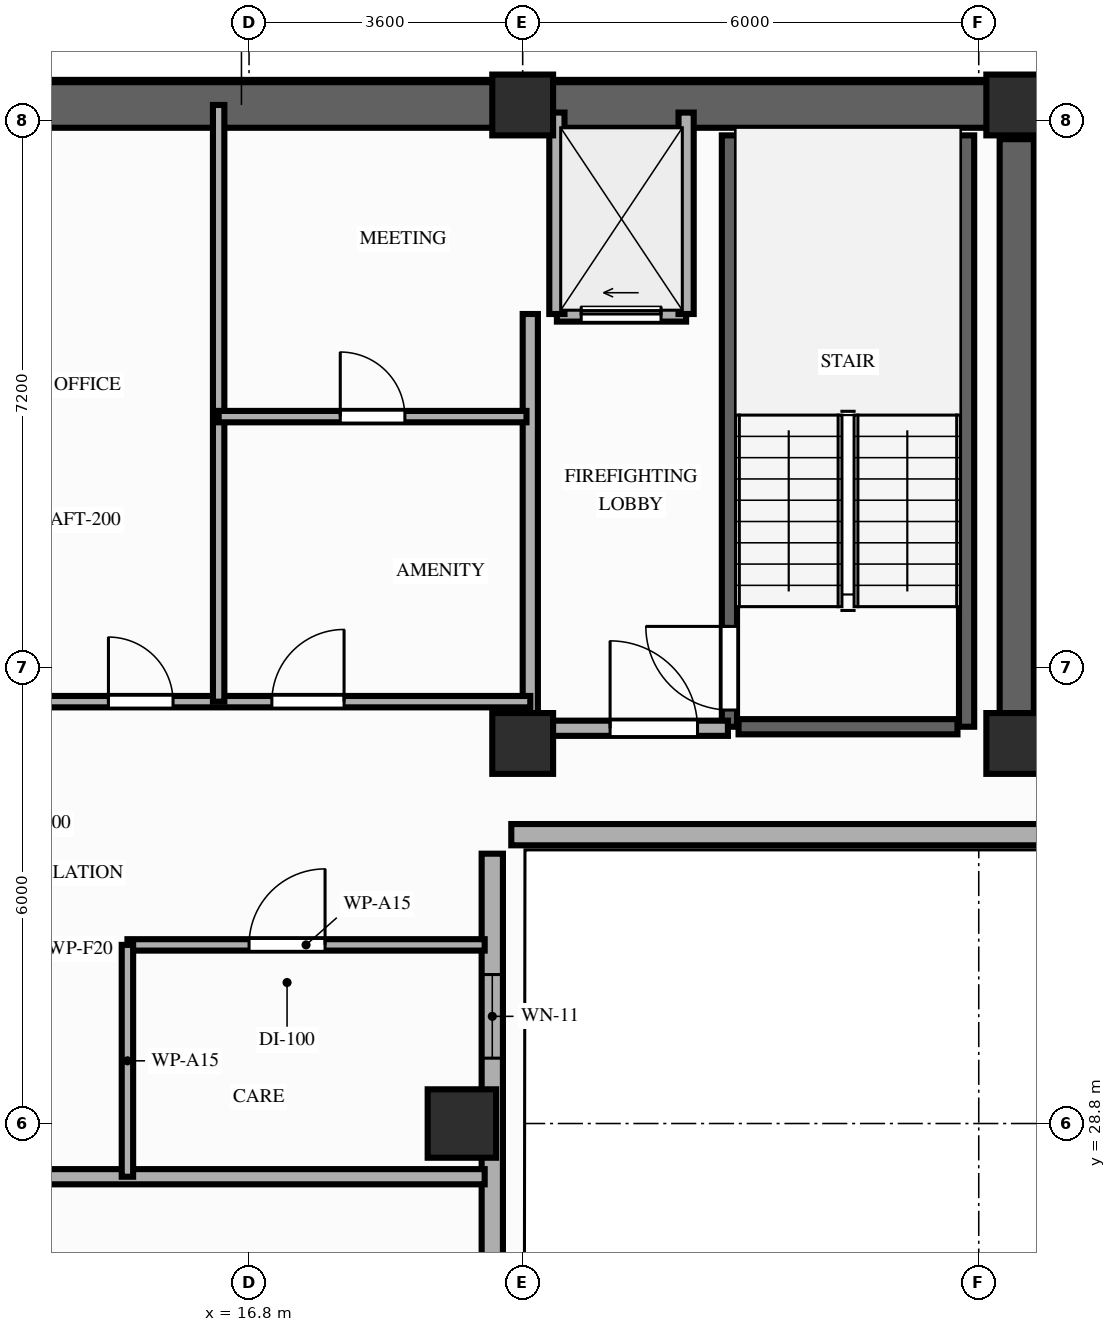
"""IFC4 building model, lengths in metres.
Left out: names, types, materials, properties, quantities, classifications, styles, units other than length and angle.
Written with IfcOpenShell. Run it as: python <this file> out.ifc"""

import sys

from ifc_helpers import new_model, si_unit, direction, frame, frame_2d, origin, origin_2d, place, context, subcontext, project, spatial, rectangle, extrude, element, fill, save


model = new_model("IFC4")
c1 = context("Model", 3, precision=1e-05, world=origin(), true_north=direction((0.0, 1.0)))
c2 = subcontext(c1, "Body", "Model", "MODEL_VIEW")
j1 = project(units=[si_unit("LENGTHUNIT", "METRE"), si_unit("PLANEANGLEUNIT", "RADIAN")], contexts=[c1])
p1 = place(None, origin())
s1 = spatial("IfcSite", under=j1, at=p1, CompositionType="ELEMENT")
p2 = place(p1, origin())
s2 = spatial("IfcBuilding", under=s1, at=p2, CompositionType="ELEMENT")
p3 = place(p2, frame((0.0, 0.0, 211.2)))
s3 = spatial("IfcBuildingStorey", under=s2, at=p3, CompositionType="ELEMENT", Elevation=211.2)
for number, where, z_axis, x_axis in (
    (1, (20.4, 33.8, 0.0), (0.0, 0.0, 1.0), (1.0, 0.0, 0.0)),
    (2, (26.9, 33.8, 0.0), (0.0, 0.0, 1.0), (1.0, 0.0, 0.0)),
    (3, (20.4, 42.2, 0.0), (0.0, 0.0, 1.0), (1.0, 0.0, 0.0)),
    (4, (26.9, 42.2, 0.0), (0.0, 0.0, 1.0), (1.0, 0.0, 0.0)),
):
    element("IfcColumn", number, at=place(p3, frame(where, z_axis=z_axis, x_axis=x_axis)), inside=s3, PredefinedType="COLUMN", context=c2, shape_type="SweptSolid", body=[
        extrude(rectangle(XDim=0.8, YDim=0.8, at=origin_2d()), origin(), (0.0, 0.0, 1.0), 3.2),
    ])
p4 = place(p3, frame((19.6, 28.8, 0.0), z_axis=(0.0, 0.0, 1.0), x_axis=(1.0, 0.0, 0.0)))
e5 = element("IfcColumn", 5, at=p4, inside=s3, PredefinedType="COLUMN", context=c2, shape_type="SweptSolid", body=[
    extrude(rectangle(XDim=0.9, YDim=0.9, at=origin_2d()), origin(), (0.0, 0.0, 1.0), 3.2),
])
p5 = place(p3, frame((20.0, 8.8, 0.0), z_axis=(0.0, 0.0, 1.0), x_axis=(0.0, 1.0, 0.0)))
e6 = element("IfcWall", 6, at=p5, inside=s3, PredefinedType="STANDARD", context=c2, shape_type="SweptSolid", body=[
    extrude(rectangle(XDim=23.55, YDim=0.28, at=frame_2d((11.775, 0.0))), origin(), (0.0, 0.0, 1.0), 2.45),
])
p6 = place(p5, frame((20.86, 0.0, 0.85)))
e7 = element("IfcOpeningElement", 7, at=p6, cuts=e6, PredefinedType="OPENING", context=c2, shape_type="SweptSolid", body=[
    extrude(rectangle(XDim=1.1, YDim=1.35, at=frame_2d((0.55, 0.675))), frame((0.0, 0.15, 0.0), z_axis=(0.0, -1.0, 0.0), x_axis=(1.0, 0.0, 0.0)), (0.0, 0.0, 1.0), 0.3),
])
p7 = place(p5, frame((5.12, 0.0, 0.85)))
e8 = element("IfcOpeningElement", 8, at=p7, cuts=e6, PredefinedType="OPENING", context=c2, shape_type="SweptSolid", body=[
    extrude(rectangle(XDim=2.1, YDim=1.35, at=frame_2d((1.05, 0.675))), frame((0.0, 0.15, 0.0), z_axis=(0.0, -1.0, 0.0), x_axis=(1.0, 0.0, 0.0)), (0.0, 0.0, 1.0), 0.3),
])
p8 = place(p5, frame((10.93, 0.0, 0.85)))
e9 = element("IfcOpeningElement", 9, at=p8, cuts=e6, PredefinedType="OPENING", context=c2, shape_type="SweptSolid", body=[
    extrude(rectangle(XDim=2.1, YDim=1.35, at=frame_2d((1.05, 0.675))), frame((0.0, 0.15, 0.0), z_axis=(0.0, -1.0, 0.0), x_axis=(1.0, 0.0, 0.0)), (0.0, 0.0, 1.0), 0.3),
])
p9 = place(p3, frame((20.25, 32.6, 0.0), z_axis=(0.0, 0.0, 1.0), x_axis=(1.0, 0.0, 0.0)))
e10 = element("IfcWall", 10, at=p9, inside=s3, PredefinedType="STANDARD", context=c2, shape_type="SweptSolid", body=[
    extrude(rectangle(XDim=7.35, YDim=0.28, at=frame_2d((3.675, 0.0))), origin(), (0.0, 0.0, 1.0), 2.45),
])
p10 = place(p3, frame((6.45, 42.2, 0.0), z_axis=(0.0, 0.0, 1.0), x_axis=(1.0, 0.0, 0.0)))
e11 = element("IfcWall", 11, at=p10, inside=s3, PredefinedType="SHEAR", context=c2, shape_type="SweptSolid", body=[
    extrude(rectangle(XDim=20.45, YDim=0.6, at=frame_2d((10.225, 0.0))), origin(), (0.0, 0.0, 1.0), 2.96),
])
p11 = place(p3, frame((26.9, 33.8, 0.0), z_axis=(0.0, 0.0, 1.0), x_axis=(0.0, 1.0, 0.0)))
e12 = element("IfcWall", 12, at=p11, inside=s3, PredefinedType="SHEAR", context=c2, shape_type="SweptSolid", body=[
    extrude(rectangle(XDim=7.95, YDim=0.45, at=frame_2d((3.975, 0.0))), origin(), (0.0, 0.0, 1.0), 2.96),
])
p12 = place(p3, frame((23.12, 34.02, 0.0), z_axis=(0.0, 0.0, 1.0), x_axis=(0.0, 1.0, 0.0)))
e13 = element("IfcWall", 13, at=p12, inside=s3, PredefinedType="SHEAR", context=c2, shape_type="SweptSolid", body=[
    extrude(rectangle(XDim=7.78, YDim=0.2, at=frame_2d((3.89, 0.0))), origin(), (0.0, 0.0, 1.0), 2.96),
])
p13 = place(p12, frame((0.22, 0.0, 0.0)))
e14 = element("IfcOpeningElement", 14, at=p13, cuts=e13, PredefinedType="OPENING", context=c2, shape_type="SweptSolid", body=[
    extrude(rectangle(XDim=1.1, YDim=2.15, at=frame_2d((0.55, 1.075))), frame((0.0, 0.11, 0.0), z_axis=(0.0, -1.0, 0.0), x_axis=(1.0, 0.0, 0.0)), (0.0, 0.0, 1.0), 0.22),
])
p14 = place(p3, frame((26.24, 34.02, 0.0), z_axis=(0.0, 0.0, 1.0), x_axis=(0.0, 1.0, 0.0)))
e15 = element("IfcWall", 15, at=p14, inside=s3, PredefinedType="SHEAR", context=c2, shape_type="SweptSolid", body=[
    extrude(rectangle(XDim=7.78, YDim=0.2, at=frame_2d((3.89, 0.0))), origin(), (0.0, 0.0, 1.0), 2.96),
])
p15 = place(p3, frame((23.24, 34.02, 0.0), z_axis=(0.0, 0.0, 1.0), x_axis=(1.0, 0.0, 0.0)))
e16 = element("IfcWall", 16, at=p15, inside=s3, PredefinedType="SHEAR", context=c2, shape_type="SweptSolid", body=[
    extrude(rectangle(XDim=2.88, YDim=0.2, at=frame_2d((1.44, 0.0))), origin(), (0.0, 0.0, 1.0), 2.96),
])
p16 = place(p3, frame((20.85, 39.45, 0.0), z_axis=(0.0, 0.0, 1.0), x_axis=(1.0, 0.0, 0.0)))
e17 = element("IfcWall", 17, at=p16, inside=s3, PredefinedType="MOVABLE", context=c2, shape_type="SweptSolid", body=[
    extrude(rectangle(XDim=1.7, YDim=0.2, at=frame_2d((0.85, 0.0))), origin(), (0.0, 0.0, 1.0), 2.96),
])
p17 = place(p16, frame((0.32, 0.0, 0.0)))
e18 = element("IfcOpeningElement", 18, at=p17, cuts=e17, PredefinedType="OPENING", context=c2, shape_type="SweptSolid", body=[
    extrude(rectangle(XDim=1.05, YDim=2.15, at=frame_2d((0.525, 1.075))), frame((0.0, 0.11, 0.0), z_axis=(0.0, -1.0, 0.0), x_axis=(1.0, 0.0, 0.0)), (0.0, 0.0, 1.0), 0.22),
])
for number, where, z_axis, x_axis in (
    (19, (20.85, 39.45, 0.0), (0.0, 0.0, 1.0), (0.0, 1.0, 0.0)),
    (20, (22.55, 39.45, 0.0), (0.0, 0.0, 1.0), (0.0, 1.0, 0.0)),
):
    element("IfcWall", number, at=place(p3, frame(where, z_axis=z_axis, x_axis=x_axis)), inside=s3, PredefinedType="MOVABLE", context=c2, shape_type="SweptSolid", body=[
        extrude(rectangle(XDim=2.65, YDim=0.2, at=frame_2d((1.325, 0.0))), origin(), (0.0, 0.0, 1.0), 2.45),
    ])
p18 = place(p3, frame((20.5, 34.0, 0.0), z_axis=(0.0, 0.0, 1.0), x_axis=(0.0, 1.0, 0.0)))
e21 = element("IfcWall", 21, at=p18, inside=s3, PredefinedType="PARTITIONING", context=c2, shape_type="SweptSolid", body=[
    extrude(rectangle(XDim=5.45, YDim=0.2, at=frame_2d((2.725, 0.0))), origin(), (0.0, 0.0, 1.0), 2.45),
])
p19 = place(p3, frame((20.5, 34.0, 0.0), z_axis=(0.0, 0.0, 1.0), x_axis=(1.0, 0.0, 0.0)))
e22 = element("IfcWall", 22, at=p19, inside=s3, PredefinedType="PARTITIONING", context=c2, shape_type="SweptSolid", body=[
    extrude(rectangle(XDim=2.6, YDim=0.2, at=frame_2d((1.3, 0.0))), origin(), (0.0, 0.0, 1.0), 2.45),
])
p20 = place(p19, frame((1.05, 0.0, 0.0)))
e23 = element("IfcOpeningElement", 23, at=p20, cuts=e22, PredefinedType="OPENING", context=c2, shape_type="SweptSolid", body=[
    extrude(rectangle(XDim=1.15, YDim=2.15, at=frame_2d((0.575, 1.075))), frame((0.0, 0.11, 0.0), z_axis=(0.0, -1.0, 0.0), x_axis=(1.0, 0.0, 0.0)), (0.0, 0.0, 1.0), 0.22),
])
p21 = place(p3, frame((12.9, 34.35, 0.0), z_axis=(0.0, 0.0, 1.0), x_axis=(1.0, 0.0, 0.0)))
e24 = element("IfcWall", 24, at=p21, inside=s3, PredefinedType="PARTITIONING", context=c2, shape_type="SweptSolid", body=[
    extrude(rectangle(XDim=7.6, YDim=0.15, at=frame_2d((3.8, 0.0))), origin(), (0.0, 0.0, 1.0), 2.96),
])
p22 = place(p21, frame((2.05, 0.0, 0.0)))
e25 = element("IfcOpeningElement", 25, at=p22, cuts=e24, PredefinedType="OPENING", context=c2, shape_type="SweptSolid", body=[
    extrude(rectangle(XDim=0.85, YDim=2.05, at=frame_2d((0.425, 1.025))), frame((0.0, 0.085, 0.0), z_axis=(0.0, -1.0, 0.0), x_axis=(1.0, 0.0, 0.0)), (0.0, 0.0, 1.0), 0.17),
])
p23 = place(p21, frame((4.2, 0.0, 0.0)))
e26 = element("IfcOpeningElement", 26, at=p23, cuts=e24, PredefinedType="OPENING", context=c2, shape_type="SweptSolid", body=[
    extrude(rectangle(XDim=0.95, YDim=2.15, at=frame_2d((0.475, 1.075))), frame((0.0, 0.085, 0.0), z_axis=(0.0, -1.0, 0.0), x_axis=(1.0, 0.0, 0.0)), (0.0, 0.0, 1.0), 0.17),
])
p24 = place(p3, frame((16.4, 34.35, 0.0), z_axis=(0.0, 0.0, 1.0), x_axis=(0.0, 1.0, 0.0)))
e27 = element("IfcWall", 27, at=p24, inside=s3, PredefinedType="PARTITIONING", context=c2, shape_type="SweptSolid", body=[
    extrude(rectangle(XDim=7.85, YDim=0.15, at=frame_2d((3.925, 0.0))), origin(), (0.0, 0.0, 1.0), 2.45),
])
p25 = place(p3, frame((16.4, 38.1, 0.0), z_axis=(0.0, 0.0, 1.0), x_axis=(1.0, 0.0, 0.0)))
e28 = element("IfcWall", 28, at=p25, inside=s3, PredefinedType="PARTITIONING", context=c2, shape_type="SweptSolid", body=[
    extrude(rectangle(XDim=4.05, YDim=0.15, at=frame_2d((2.025, 0.0))), origin(), (0.0, 0.0, 1.0), 2.96),
])
p26 = place(p25, frame((1.6, 0.0, 0.0)))
e29 = element("IfcOpeningElement", 29, at=p26, cuts=e28, PredefinedType="OPENING", context=c2, shape_type="SweptSolid", body=[
    extrude(rectangle(XDim=0.85, YDim=2.05, at=frame_2d((0.425, 1.025))), frame((0.0, 0.085, 0.0), z_axis=(0.0, -1.0, 0.0), x_axis=(1.0, 0.0, 0.0)), (0.0, 0.0, 1.0), 0.17),
])
p27 = place(p3, frame((12.91, 28.1, 0.0), z_axis=(0.0, 0.0, 1.0), x_axis=(1.0, 0.0, 0.0)))
e30 = element("IfcWall", 30, at=p27, inside=s3, PredefinedType="PARTITIONING", context=c2, shape_type="SweptSolid", body=[
    extrude(rectangle(XDim=6.99, YDim=0.2, at=frame_2d((3.495, 0.0))), origin(), (0.0, 0.0, 1.0), 2.45),
])
p28 = place(p3, frame((15.2, 31.15, 0.0), z_axis=(0.0, 0.0, 1.0), x_axis=(1.0, 0.0, 0.0)))
e31 = element("IfcWall", 31, at=p28, inside=s3, PredefinedType="PARTITIONING", context=c2, shape_type="SweptSolid", body=[
    extrude(rectangle(XDim=4.7, YDim=0.15, at=frame_2d((2.35, 0.0))), origin(), (0.0, 0.0, 1.0), 2.45),
])
p29 = place(p28, frame((1.6, 0.0, 0.0)))
e32 = element("IfcOpeningElement", 32, at=p29, cuts=e31, PredefinedType="OPENING", context=c2, shape_type="SweptSolid", body=[
    extrude(rectangle(XDim=1.0, YDim=2.15, at=frame_2d((0.5, 1.075))), frame((0.0, 0.085, 0.0), z_axis=(0.0, -1.0, 0.0), x_axis=(1.0, 0.0, 0.0)), (0.0, 0.0, 1.0), 0.17),
])
p30 = place(p3, frame((15.2, 28.1, 0.0), z_axis=(0.0, 0.0, 1.0), x_axis=(0.0, 1.0, 0.0)))
e33 = element("IfcWall", 33, at=p30, inside=s3, PredefinedType="PARTITIONING", context=c2, shape_type="SweptSolid", body=[
    extrude(rectangle(XDim=3.05, YDim=0.15, at=frame_2d((1.525, 0.0))), origin(), (0.0, 0.0, 1.0), 2.45),
])
p31 = place(p6, origin())
e34 = element("IfcWindow", 34, at=p31, inside=s3, PartitioningType="SINGLE_PANEL", PredefinedType="WINDOW", context=c2, shape_type="SweptSolid", body=[
    extrude(rectangle(XDim=1.1, YDim=1.35, at=frame_2d((0.55, 0.675))), frame((0.0, 0.03, 0.0), z_axis=(0.0, -1.0, 0.0), x_axis=(1.0, 0.0, 0.0)), (0.0, 0.0, 1.0), 0.06),
])
fill(e7, e34)
p32 = place(p13, origin())
e35 = element("IfcDoor", 35, at=p32, inside=s3, OperationType="SINGLE_SWING_RIGHT", PredefinedType="DOOR", context=c2, shape_type="SweptSolid", body=[
    extrude(rectangle(XDim=1.1, YDim=2.15, at=frame_2d((0.55, 1.075))), frame((0.0, 0.025, 0.0), z_axis=(0.0, -1.0, 0.0), x_axis=(1.0, 0.0, 0.0)), (0.0, 0.0, 1.0), 0.05),
])
fill(e14, e35)
p33 = place(p17, origin())
e36 = element("IfcDoor", 36, at=p33, inside=s3, OperationType="SLIDING_TO_LEFT", PredefinedType="DOOR", context=c2, shape_type="SweptSolid", body=[
    extrude(rectangle(XDim=1.05, YDim=2.15, at=frame_2d((0.525, 1.075))), frame((0.0, 0.025, 0.0), z_axis=(0.0, -1.0, 0.0), x_axis=(1.0, 0.0, 0.0)), (0.0, 0.0, 1.0), 0.05),
])
fill(e18, e36)
p34 = place(p20, origin())
e37 = element("IfcDoor", 37, at=p34, inside=s3, OperationType="SINGLE_SWING_LEFT", PredefinedType="DOOR", context=c2, shape_type="SweptSolid", body=[
    extrude(rectangle(XDim=1.15, YDim=2.15, at=frame_2d((0.575, 1.075))), frame((0.0, 0.025, 0.0), z_axis=(0.0, -1.0, 0.0), x_axis=(1.0, 0.0, 0.0)), (0.0, 0.0, 1.0), 0.05),
])
fill(e23, e37)
p35 = place(p22, origin())
e38 = element("IfcDoor", 38, at=p35, inside=s3, OperationType="SINGLE_SWING_LEFT", PredefinedType="DOOR", context=c2, shape_type="SweptSolid", body=[
    extrude(rectangle(XDim=0.85, YDim=2.05, at=frame_2d((0.425, 1.025))), frame((0.0, 0.025, 0.0), z_axis=(0.0, -1.0, 0.0), x_axis=(1.0, 0.0, 0.0)), (0.0, 0.0, 1.0), 0.05),
])
fill(e25, e38)
p36 = place(p23, origin())
e39 = element("IfcDoor", 39, at=p36, inside=s3, OperationType="SINGLE_SWING_RIGHT", PredefinedType="DOOR", context=c2, shape_type="SweptSolid", body=[
    extrude(rectangle(XDim=0.95, YDim=2.15, at=frame_2d((0.475, 1.075))), frame((0.0, 0.025, 0.0), z_axis=(0.0, -1.0, 0.0), x_axis=(1.0, 0.0, 0.0)), (0.0, 0.0, 1.0), 0.05),
])
fill(e26, e39)
p37 = place(p26, origin())
e40 = element("IfcDoor", 40, at=p37, inside=s3, OperationType="SINGLE_SWING_LEFT", PredefinedType="DOOR", context=c2, shape_type="SweptSolid", body=[
    extrude(rectangle(XDim=0.85, YDim=2.05, at=frame_2d((0.425, 1.025))), frame((0.0, 0.025, 0.0), z_axis=(0.0, -1.0, 0.0), x_axis=(1.0, 0.0, 0.0)), (0.0, 0.0, 1.0), 0.05),
])
fill(e29, e40)
p38 = place(p29, origin())
e41 = element("IfcDoor", 41, at=p38, inside=s3, OperationType="SINGLE_SWING_RIGHT", PredefinedType="DOOR", context=c2, shape_type="SweptSolid", body=[
    extrude(rectangle(XDim=1.0, YDim=2.15, at=frame_2d((0.5, 1.075))), frame((0.0, 0.025, 0.0), z_axis=(0.0, -1.0, 0.0), x_axis=(1.0, 0.0, 0.0)), (0.0, 0.0, 1.0), 0.05),
])
fill(e32, e41)
save(model, sys.argv[1])
